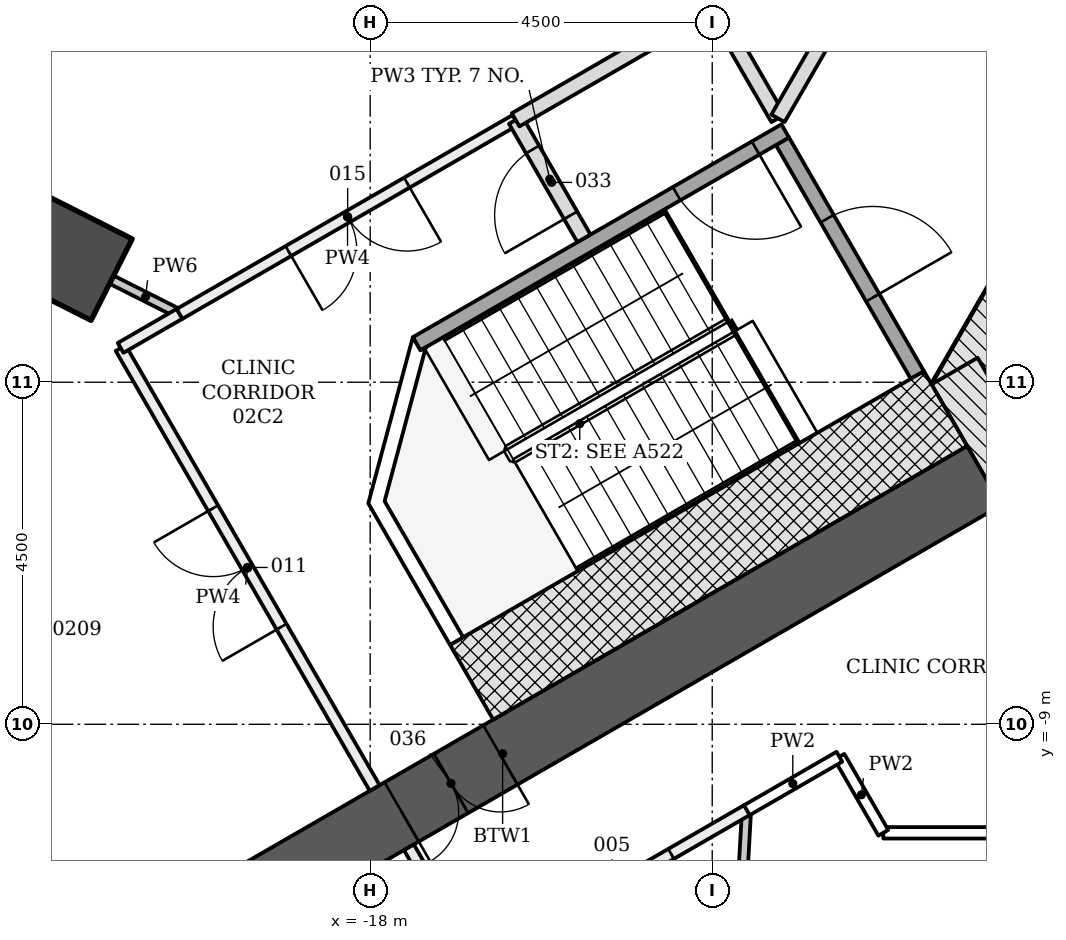
"""IFC4 building model, lengths in metres.
Left out: names, types, materials, properties, quantities, classifications, styles, units other than length and angle.
Written with IfcOpenShell. Run it as: python <this file> out.ifc"""

import sys

from ifc_helpers import new_model, si_unit, direction, frame, frame_2d, origin, origin_2d, place, context, subcontext, project, spatial, polyline, rectangle, outline, extrude, element, fill, save


model = new_model("IFC4")
c1 = context("Model", 3, precision=1e-05, world=origin(), true_north=direction((0.0, 1.0)))
c2 = subcontext(c1, "Body", "Model", "MODEL_VIEW")
j1 = project(units=[si_unit("LENGTHUNIT", "METRE"), si_unit("PLANEANGLEUNIT", "RADIAN")], contexts=[c1])
p1 = place(None, origin())
s1 = spatial("IfcSite", under=j1, at=p1, CompositionType="ELEMENT")
p2 = place(p1, origin())
s2 = spatial("IfcBuilding", under=s1, at=p2, CompositionType="ELEMENT")
p3 = place(p2, frame((0.0, 0.0, 10.5)))
s3 = spatial("IfcBuildingStorey", under=s2, at=p3, CompositionType="ELEMENT", Elevation=10.5)
p4 = place(p3, frame((-21.937, -2.88, -0.25), z_axis=(0.0, 0.0, 1.0), x_axis=(-0.89250065469, 0.451046096733, 0.0)))
e1 = element("IfcColumn", 1, at=p4, inside=s3, PredefinedType="COLUMN", context=c2, shape_type="SweptSolid", body=[
    extrude(rectangle(XDim=1.2, YDim=1.2, at=origin_2d()), origin(), (0.0, 0.0, 1.0), 4.5),
])
p5 = place(p3, frame((-1.083, 11.281, -0.25), z_axis=(0.0, 0.0, 1.0), x_axis=(-0.500001446645, -0.866024568562, 0.0)))
e2 = element("IfcWall", 2, at=p5, inside=s3, PredefinedType="SHEAR", context=c2, shape_type="SweptSolid", body=[
    extrude(rectangle(XDim=18.458, YDim=0.7, at=frame_2d((9.229, 0.0))), origin(), (0.0, 0.0, 1.0), 4.5),
])
p6 = place(p5, frame((8.979, 0.0, 0.25)))
e3 = element("IfcOpeningElement", 3, at=p6, cuts=e2, PredefinedType="OPENING", context=c2, shape_type="SweptSolid", body=[
    extrude(rectangle(XDim=1.2, YDim=2.1, at=frame_2d((0.6, 1.05))), frame((0.0, 0.36, 0.0), z_axis=(0.0, -1.0, 0.0), x_axis=(1.0, 0.0, 0.0)), (0.0, 0.0, 1.0), 0.72),
])
p7 = place(p5, frame((11.029, 0.0, 0.25)))
e4 = element("IfcOpeningElement", 4, at=p7, cuts=e2, PredefinedType="OPENING", context=c2, shape_type="SweptSolid", body=[
    extrude(rectangle(XDim=1.2, YDim=2.1, at=frame_2d((0.6, 1.05))), frame((0.0, 0.36, 0.0), z_axis=(0.0, -1.0, 0.0), x_axis=(1.0, 0.0, 0.0)), (0.0, 0.0, 1.0), 0.72),
])
p8 = place(p3, frame((-10.311, -4.353, -0.25), z_axis=(0.0, 0.0, 1.0), x_axis=(0.500042739161, -0.866000726912, 0.0)))
e5 = element("IfcWall", 5, at=p8, inside=s3, PredefinedType="SHEAR", context=c2, shape_type="SweptSolid", body=[
    extrude(rectangle(XDim=2.771, YDim=0.7, at=frame_2d((1.386, 0.0))), origin(), (0.0, 0.0, 1.0), 4.5),
])
p9 = place(p3, frame((-9.922, -5.728, -0.25), z_axis=(0.0, 0.0, 1.0), x_axis=(-0.866028046028, -0.499995423472, 0.0)))
e6 = element("IfcWall", 6, at=p9, inside=s3, PredefinedType="SHEAR", context=c2, shape_type="SweptSolid", body=[
    extrude(rectangle(XDim=14.633, YDim=0.9, at=frame_2d((7.316, 0.0))), origin(), (0.0, 0.0, 1.0), 4.5),
])
p10 = place(p9, frame((7.35, 0.0, 0.25)))
e7 = element("IfcOpeningElement", 7, at=p10, cuts=e6, PredefinedType="OPENING", context=c2, shape_type="SweptSolid", body=[
    extrude(rectangle(XDim=1.5, YDim=2.1, at=frame_2d((0.75, 1.05))), frame((0.0, 0.46, 0.0), z_axis=(0.0, -1.0, 0.0), x_axis=(1.0, 0.0, 0.0)), (0.0, 0.0, 1.0), 0.92),
])
p11 = place(p3, frame((-12.576, -1.331, -0.25), z_axis=(0.0, 0.0, 1.0), x_axis=(0.499970499736, -0.8660424351, 0.0)))
e8 = element("IfcWall", 8, at=p11, inside=s3, PredefinedType="SHEAR", context=c2, shape_type="SweptSolid", body=[
    extrude(rectangle(XDim=3.55, YDim=0.2, at=frame_2d((1.775, 0.0))), origin(), (0.0, 0.0, 1.0), 4.5),
])
p12 = place(p11, frame((1.175, 0.0, 0.25)))
e9 = element("IfcOpeningElement", 9, at=p12, cuts=e8, PredefinedType="OPENING", context=c2, shape_type="SweptSolid", body=[
    extrude(rectangle(XDim=1.2, YDim=2.1, at=frame_2d((0.6, 1.05))), frame((0.0, 0.11, 0.0), z_axis=(0.0, -1.0, 0.0), x_axis=(1.0, 0.0, 0.0)), (0.0, 0.0, 1.0), 0.22),
])
p13 = place(p3, frame((-12.539, -1.194, -0.25), z_axis=(0.0, 0.0, 1.0), x_axis=(-0.866045472092, -0.499965239061, 0.0)))
e10 = element("IfcWall", 10, at=p13, inside=s3, PredefinedType="SHEAR", context=c2, shape_type="SweptSolid", body=[
    extrude(rectangle(XDim=5.6, YDim=0.2, at=frame_2d((2.8, 0.0))), origin(), (0.0, 0.0, 1.0), 4.5),
])
p14 = place(p13, frame((0.45, 0.0, 0.25)))
e11 = element("IfcOpeningElement", 11, at=p14, cuts=e10, PredefinedType="OPENING", context=c2, shape_type="SweptSolid", body=[
    extrude(rectangle(XDim=1.2, YDim=2.1, at=frame_2d((0.6, 1.05))), frame((0.0, 0.11, 0.0), z_axis=(0.0, -1.0, 0.0), x_axis=(1.0, 0.0, 0.0)), (0.0, 0.0, 1.0), 0.22),
])
p15 = place(p3, frame((-10.43, -4.847, -0.25), z_axis=(0.0, 0.0, 1.0), x_axis=(-0.866018442252, -0.500012057535, 0.0)))
e12 = element("IfcWall", 12, at=p15, inside=s3, PredefinedType="SHEAR", context=c2, shape_type="SweptSolid", body=[
    extrude(rectangle(XDim=7.2, YDim=1.136, at=frame_2d((3.6, 0.0))), origin(), (0.0, 0.0, 1.0), 4.5),
])
p16 = place(p3, frame((0.0, 0.0, -0.25)))
e13 = element("IfcWall", 13, at=p16, inside=s3, PredefinedType="SHEAR", context=c2, shape_type="SweptSolid", body=[
    extrude(outline(polyline([(-17.439, -3.907), (-18.025, -6.093), (-16.95, -7.955), (-16.777, -7.855), (-17.81, -6.065), (-17.267, -4.039), (-17.339, -4.081), (-17.339, -4.081), (-17.339, -4.081), (-17.339, -4.081), (-17.339, -4.081), (-17.339, -4.081), (-17.339, -4.081), (-17.339, -4.081), (-17.339, -4.081), (-17.339, -4.081), (-17.339, -4.081), (-17.339, -4.081), (-17.339, -4.081), (-17.339, -4.081), (-17.339, -4.081), (-17.339, -4.081), (-17.339, -4.081), (-17.439, -3.907)])), origin(), (0.0, 0.0, 1.0), 4.5),
])
p17 = place(p3, frame((-13.429, -16.96, 0.0), z_axis=(0.0, 0.0, 1.0), x_axis=(0.055551088657, 0.998455846069, 0.0)))
e14 = element("IfcWall", 14, at=p17, inside=s3, PredefinedType="PARTITIONING", context=c2, shape_type="SweptSolid", body=[
    extrude(rectangle(XDim=6.838, YDim=0.12, at=frame_2d((3.419, 0.0))), origin(), (0.0, 0.0, 1.0), 3.638),
])
p18 = place(p3, frame((-13.045, -10.13, 0.0), z_axis=(0.0, 0.0, 1.0), x_axis=(-0.866035577775, -0.499982377718, 0.0)))
e15 = element("IfcWall", 15, at=p18, inside=s3, PredefinedType="PARTITIONING", context=c2, shape_type="SweptSolid", body=[
    extrude(rectangle(XDim=4.093, YDim=0.15, at=frame_2d((2.046, 0.0))), origin(), (0.0, 0.0, 1.0), 3.638),
])
p19 = place(p18, frame((1.15, 0.0, 0.0)))
e16 = element("IfcOpeningElement", 16, at=p19, cuts=e15, PredefinedType="OPENING", context=c2, shape_type="SweptSolid", body=[
    extrude(rectangle(XDim=1.8, YDim=2.1, at=frame_2d((0.9, 1.05))), frame((0.0, 0.085, 0.0), z_axis=(0.0, -1.0, 0.0), x_axis=(1.0, 0.0, 0.0)), (0.0, 0.0, 1.0), 0.17),
])
p20 = place(p3, frame((-16.591, -12.176, 0.0), z_axis=(0.0, 0.0, 1.0), x_axis=(-0.499965372359, 0.866045395139, 0.0)))
e17 = element("IfcWall", 17, at=p20, inside=s3, PredefinedType="PARTITIONING", context=c2, shape_type="SweptSolid", body=[
    extrude(rectangle(XDim=1.798, YDim=0.15, at=frame_2d((0.899, 0.0))), origin(), (0.0, 0.0, 1.0), 3.638),
])
p21 = place(p3, frame((-4.347, -10.428, 0.0), z_axis=(0.0, 0.0, 1.0), x_axis=(-1.0, 0.0, 0.0)))
e18 = element("IfcWall", 18, at=p21, inside=s3, PredefinedType="PARTITIONING", context=c2, shape_type="SweptSolid", body=[
    extrude(rectangle(XDim=6.902, YDim=0.15, at=frame_2d((3.451, 0.0))), origin(), (0.0, 0.0, 1.0), 3.638),
])
p22 = place(p21, frame((2.55, 0.0, 0.0)))
e19 = element("IfcOpeningElement", 19, at=p22, cuts=e18, PredefinedType="OPENING", context=c2, shape_type="SweptSolid", body=[
    extrude(rectangle(XDim=1.8, YDim=2.1, at=frame_2d((0.9, 1.05))), frame((0.0, 0.085, 0.0), z_axis=(0.0, -1.0, 0.0), x_axis=(1.0, 0.0, 0.0)), (0.0, 0.0, 1.0), 0.17),
])
p23 = place(p3, frame((-11.249, -10.428, 0.0), z_axis=(0.0, 0.0, 1.0), x_axis=(-0.499978438088, 0.866037852202, 0.0)))
e20 = element("IfcWall", 20, at=p23, inside=s3, PredefinedType="PARTITIONING", context=c2, shape_type="SweptSolid", body=[
    extrude(rectangle(XDim=1.156, YDim=0.15, at=frame_2d((0.578, 0.0))), origin(), (0.0, 0.0, 1.0), 4.25),
])
p24 = place(p3, frame((-11.827, -9.427, 0.0), z_axis=(0.0, 0.0, 1.0), x_axis=(-0.865984561414, -0.500070734389, 0.0)))
e21 = element("IfcWall", 21, at=p24, inside=s3, PredefinedType="PARTITIONING", context=c2, shape_type="SweptSolid", body=[
    extrude(rectangle(XDim=1.416, YDim=0.15, at=frame_2d((0.708, 0.0))), origin(), (0.0, 0.0, 1.0), 3.638),
])
p25 = place(p3, frame((-17.941, -9.838, 0.0), z_axis=(0.0, 0.0, 1.0), x_axis=(-0.500048140185, 0.865997608252, 0.0)))
e22 = element("IfcWall", 22, at=p25, inside=s3, PredefinedType="PARTITIONING", context=c2, shape_type="SweptSolid", body=[
    extrude(rectangle(XDim=6.683, YDim=0.15, at=frame_2d((3.342, 0.0))), origin(), (0.0, 0.0, 1.0), 3.638),
])
p26 = place(p25, frame((2.45, 0.0, 0.0)))
e23 = element("IfcOpeningElement", 23, at=p26, cuts=e22, PredefinedType="OPENING", context=c2, shape_type="SweptSolid", body=[
    extrude(rectangle(XDim=1.8, YDim=2.1, at=frame_2d((0.9, 1.05))), frame((0.0, 0.085, 0.0), z_axis=(0.0, -1.0, 0.0), x_axis=(1.0, 0.0, 0.0)), (0.0, 0.0, 1.0), 0.17),
])
p27 = place(p3, frame((-21.283, -4.048, 0.0), z_axis=(0.0, 0.0, 1.0), x_axis=(0.865804825377, 0.500381858538, 0.0)))
e24 = element("IfcWall", 24, at=p27, inside=s3, PredefinedType="PARTITIONING", context=c2, shape_type="SweptSolid", body=[
    extrude(rectangle(XDim=0.897, YDim=0.15, at=frame_2d((0.449, 0.0))), origin(), (0.0, 0.0, 1.0), 3.638),
])
p28 = place(p3, frame((-20.509, -3.601, 0.0), z_axis=(0.0, 0.0, 1.0), x_axis=(-0.892710007007, 0.450631604961, 0.0)))
e25 = element("IfcWall", 25, at=p28, inside=s3, PredefinedType="PARTITIONING", context=c2, shape_type="SweptSolid", body=[
    extrude(rectangle(XDim=0.999, YDim=0.12, at=frame_2d((0.5, 0.0))), origin(), (0.0, 0.0, 1.0), 3.638),
])
p29 = place(p3, frame((-16.088, -1.049, 0.0), z_axis=(0.0, 0.0, 1.0), x_axis=(-0.866023883975, -0.500002632377, 0.0)))
e26 = element("IfcWall", 26, at=p29, inside=s3, PredefinedType="PARTITIONING", context=c2, shape_type="SweptSolid", body=[
    extrude(rectangle(XDim=5.104, YDim=0.15, at=frame_2d((2.552, 0.0))), origin(), (0.0, 0.0, 1.0), 3.638),
])
p30 = place(p29, frame((1.65, 0.0, 0.0)))
e27 = element("IfcOpeningElement", 27, at=p30, cuts=e26, PredefinedType="OPENING", context=c2, shape_type="SweptSolid", body=[
    extrude(rectangle(XDim=1.8, YDim=2.1, at=frame_2d((0.9, 1.05))), frame((0.0, 0.085, 0.0), z_axis=(0.0, -1.0, 0.0), x_axis=(1.0, 0.0, 0.0)), (0.0, 0.0, 1.0), 0.17),
])
p31 = place(p3, frame((-15.188, -2.607, 0.0), z_axis=(0.0, 0.0, 1.0), x_axis=(-0.500024172624, 0.866011447264, 0.0)))
e28 = element("IfcWall", 28, at=p31, inside=s3, PredefinedType="PARTITIONING", context=c2, shape_type="SweptSolid", body=[
    extrude(rectangle(XDim=1.798, YDim=0.2, at=frame_2d((0.899, 0.0))), origin(), (0.0, 0.0, 1.0), 3.638),
])
p32 = place(p31, frame((0.35, 0.0, 0.0)))
e29 = element("IfcOpeningElement", 29, at=p32, cuts=e28, PredefinedType="OPENING", context=c2, shape_type="SweptSolid", body=[
    extrude(rectangle(XDim=1.0, YDim=2.1, at=frame_2d((0.5, 1.05))), frame((0.0, 0.11, 0.0), z_axis=(0.0, -1.0, 0.0), x_axis=(1.0, 0.0, 0.0)), (0.0, 0.0, 1.0), 0.22),
])
p33 = place(p3, frame((-16.087, -1.048, 0.0), z_axis=(0.0, 0.0, 1.0), x_axis=(0.865988915629, 0.500063194015, 0.0)))
e30 = element("IfcWall", 30, at=p33, inside=s3, PredefinedType="PARTITIONING", context=c2, shape_type="SweptSolid", body=[
    extrude(rectangle(XDim=2.998, YDim=0.2, at=frame_2d((1.499, 0.0))), origin(), (0.0, 0.0, 1.0), 3.638),
])
p34 = place(p3, frame((-13.489, 0.451, 0.0), z_axis=(0.0, 0.0, 1.0), x_axis=(0.500044178772, -0.865999895656, 0.0)))
e31 = element("IfcWall", 31, at=p34, inside=s3, PredefinedType="PARTITIONING", context=c2, shape_type="SweptSolid", body=[
    extrude(rectangle(XDim=1.708, YDim=0.2, at=frame_2d((0.854, 0.0))), origin(), (0.0, 0.0, 1.0), 4.25),
])
p35 = place(p3, frame((-12.635, -1.028, 0.0), z_axis=(0.0, 0.0, 1.0), x_axis=(0.499801250411, 0.866140121509, 0.0)))
e32 = element("IfcWall", 32, at=p35, inside=s3, PredefinedType="PARTITIONING", context=c2, shape_type="SweptSolid", body=[
    extrude(rectangle(XDim=2.861, YDim=0.2, at=frame_2d((1.431, 0.0))), origin(), (0.0, 0.0, 1.0), 3.638),
])
p36 = place(p12, origin())
e33 = element("IfcDoor", 33, at=p36, inside=s3, OperationType="SINGLE_SWING_RIGHT", PredefinedType="DOOR", context=c2, shape_type="SweptSolid", body=[
    extrude(rectangle(XDim=1.2, YDim=2.1, at=frame_2d((0.6, 1.05))), frame((0.0, 0.025, 0.0), z_axis=(0.0, -1.0, 0.0), x_axis=(1.0, 0.0, 0.0)), (0.0, 0.0, 1.0), 0.05),
])
fill(e9, e33)
p37 = place(p14, origin())
e34 = element("IfcDoor", 34, at=p37, inside=s3, OperationType="SINGLE_SWING_LEFT", PredefinedType="DOOR", context=c2, shape_type="SweptSolid", body=[
    extrude(rectangle(XDim=1.2, YDim=2.1, at=frame_2d((0.6, 1.05))), frame((0.0, 0.025, 0.0), z_axis=(0.0, -1.0, 0.0), x_axis=(1.0, 0.0, 0.0)), (0.0, 0.0, 1.0), 0.05),
])
fill(e11, e34)
p38 = place(p19, origin())
e35 = element("IfcDoor", 35, at=p38, inside=s3, OperationType="DOUBLE_DOOR_SINGLE_SWING", PredefinedType="DOOR", context=c2, shape_type="SweptSolid", body=[
    extrude(rectangle(XDim=1.8, YDim=2.1, at=frame_2d((0.9, 1.05))), frame((0.0, 0.025, 0.0), z_axis=(0.0, -1.0, 0.0), x_axis=(1.0, 0.0, 0.0)), (0.0, 0.0, 1.0), 0.05),
])
fill(e16, e35)
p39 = place(p26, origin())
e36 = element("IfcDoor", 36, at=p39, inside=s3, OperationType="DOUBLE_DOOR_SINGLE_SWING", PredefinedType="DOOR", context=c2, shape_type="SweptSolid", body=[
    extrude(rectangle(XDim=1.8, YDim=2.1, at=frame_2d((0.9, 1.05))), frame((0.0, 0.025, 0.0), z_axis=(0.0, -1.0, 0.0), x_axis=(1.0, 0.0, 0.0)), (0.0, 0.0, 1.0), 0.05),
])
fill(e23, e36)
p40 = place(p30, origin())
e37 = element("IfcDoor", 37, at=p40, inside=s3, OperationType="DOUBLE_DOOR_SINGLE_SWING", PredefinedType="DOOR", context=c2, shape_type="SweptSolid", body=[
    extrude(rectangle(XDim=1.8, YDim=2.1, at=frame_2d((0.9, 1.05))), frame((0.0, 0.025, 0.0), z_axis=(0.0, -1.0, 0.0), x_axis=(1.0, 0.0, 0.0)), (0.0, 0.0, 1.0), 0.05),
])
fill(e27, e37)
p41 = place(p32, origin())
e38 = element("IfcDoor", 38, at=p41, inside=s3, OperationType="SINGLE_SWING_LEFT", PredefinedType="DOOR", context=c2, shape_type="SweptSolid", body=[
    extrude(rectangle(XDim=1.0, YDim=2.1, at=frame_2d((0.5, 1.05))), frame((0.0, 0.025, 0.0), z_axis=(0.0, -1.0, 0.0), x_axis=(1.0, 0.0, 0.0)), (0.0, 0.0, 1.0), 0.05),
])
fill(e29, e38)
p42 = place(p10, origin())
e39 = element("IfcDoor", 39, at=p42, inside=s3, OperationType="DOUBLE_DOOR_SINGLE_SWING", PredefinedType="DOOR", context=c2, shape_type="SweptSolid", body=[
    extrude(rectangle(XDim=1.5, YDim=2.1, at=frame_2d((0.75, 1.05))), frame((0.0, 0.025, 0.0), z_axis=(0.0, -1.0, 0.0), x_axis=(1.0, 0.0, 0.0)), (0.0, 0.0, 1.0), 0.05),
])
fill(e7, e39)
save(model, sys.argv[1])
